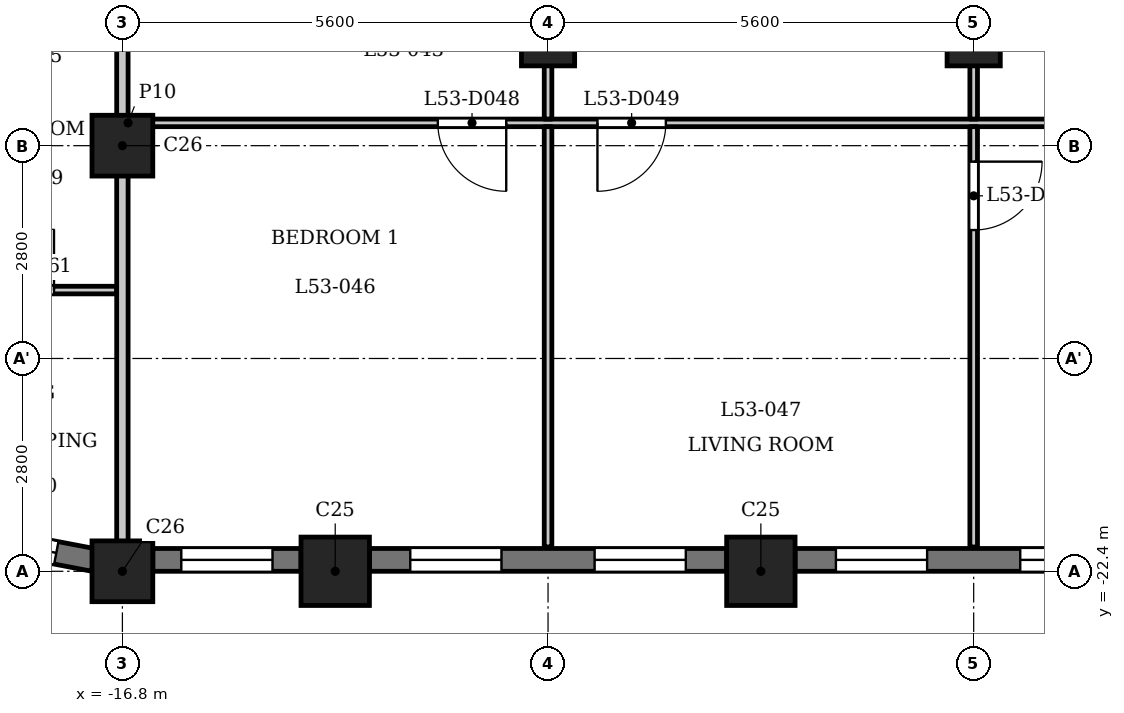
"""IFC4 building model, lengths in metres.
Left out: names, types, materials, properties, quantities, classifications, styles, units other than length and angle.
Written with IfcOpenShell. Run it as: python <this file> out.ifc"""

import sys

from ifc_helpers import new_model, si_unit, direction, frame, frame_2d, origin, origin_2d, place, context, subcontext, project, spatial, rectangle, extrude, element, fill, save


model = new_model("IFC4")
c1 = context("Model", 3, precision=1e-05, world=origin(), true_north=direction((0.0, 1.0)))
c2 = subcontext(c1, "Body", "Model", "MODEL_VIEW")
j1 = project(units=[si_unit("LENGTHUNIT", "METRE"), si_unit("PLANEANGLEUNIT", "RADIAN")], contexts=[c1])
p1 = place(None, origin())
s1 = spatial("IfcSite", under=j1, at=p1, CompositionType="ELEMENT")
p2 = place(p1, origin())
s2 = spatial("IfcBuilding", under=s1, at=p2, CompositionType="ELEMENT")
p3 = place(p2, frame((0.0, 0.0, 206.4)))
s3 = spatial("IfcBuildingStorey", under=s2, at=p3, CompositionType="ELEMENT", Elevation=206.4)
for number, where, z_axis, x_axis in (
    (1, (-14.0, -22.4, 0.0), (0.0, 0.0, 1.0), (1.0, 0.0, 0.0)),
    (2, (-8.4, -22.4, 0.0), (0.0, 0.0, 1.0), (1.0, 0.0, 0.0)),
):
    element("IfcColumn", number, at=place(p3, frame(where, z_axis=z_axis, x_axis=x_axis)), inside=s3, PredefinedType="COLUMN", context=c2, shape_type="SweptSolid", body=[
        extrude(rectangle(XDim=0.9, YDim=0.9, at=origin_2d()), origin(), (0.0, 0.0, 1.0), 3.5),
    ])
for number, where, z_axis, x_axis in (
    (3, (-16.8, -22.4, 0.0), (0.0, 0.0, 1.0), (1.0, 0.0, 0.0)),
    (4, (-16.8, -16.8, 0.0), (0.0, 0.0, 1.0), (1.0, 0.0, 0.0)),
):
    element("IfcColumn", number, at=place(p3, frame(where, z_axis=z_axis, x_axis=x_axis)), inside=s3, PredefinedType="COLUMN", context=c2, shape_type="SweptSolid", body=[
        extrude(rectangle(XDim=0.8, YDim=0.8, at=origin_2d()), origin(), (0.0, 0.0, 1.0), 3.5),
    ])
for number, where, z_axis, x_axis in (
    (5, (-11.2, -15.4, 0.0), (0.0, 0.0, 1.0), (1.0, 0.0, 0.0)),
    (6, (-5.6, -15.4, 0.0), (0.0, 0.0, 1.0), (1.0, 0.0, 0.0)),
):
    element("IfcColumn", number, at=place(p3, frame(where, z_axis=z_axis, x_axis=x_axis)), inside=s3, PredefinedType="COLUMN", context=c2, shape_type="SweptSolid", body=[
        extrude(rectangle(XDim=0.7, YDim=0.7, at=origin_2d()), origin(), (0.0, 0.0, 1.0), 3.5),
    ])
p4 = place(p3, frame((-18.946, -21.914, 0.0), z_axis=(0.0, 0.0, 1.0), x_axis=(0.98230529033, -0.187286722942, 0.0)))
e7 = element("IfcWall", 7, at=p4, inside=s3, PredefinedType="SOLIDWALL", context=c2, shape_type="SweptSolid", body=[
    extrude(rectangle(XDim=1.799, YDim=0.3, at=frame_2d((0.899, 0.0))), origin(), (0.0, 0.0, 1.0), 2.5),
])
p5 = place(p4, frame((0.5, 0.0, 0.6)))
e8 = element("IfcOpeningElement", 8, at=p5, cuts=e7, PredefinedType="OPENING", context=c2, shape_type="SweptSolid", body=[
    extrude(rectangle(XDim=0.8, YDim=1.55, at=frame_2d((0.4, 0.775))), frame((0.0, 0.16, 0.0), z_axis=(0.0, -1.0, 0.0), x_axis=(1.0, 0.0, 0.0)), (0.0, 0.0, 1.0), 0.32),
])
p6 = place(p3, frame((-16.4, -22.25, 0.0), z_axis=(0.0, 0.0, 1.0), x_axis=(1.0, 0.0, 0.0)))
e9 = element("IfcWall", 9, at=p6, inside=s3, PredefinedType="SOLIDWALL", context=c2, shape_type="SweptSolid", body=[
    extrude(rectangle(XDim=1.95, YDim=0.3, at=frame_2d((0.975, 0.0))), origin(), (0.0, 0.0, 1.0), 2.5),
])
p7 = place(p6, frame((0.375, 0.0, 0.6)))
e10 = element("IfcOpeningElement", 10, at=p7, cuts=e9, PredefinedType="OPENING", context=c2, shape_type="SweptSolid", body=[
    extrude(rectangle(XDim=1.2, YDim=1.55, at=frame_2d((0.6, 0.775))), frame((0.0, 0.16, 0.0), z_axis=(0.0, -1.0, 0.0), x_axis=(1.0, 0.0, 0.0)), (0.0, 0.0, 1.0), 0.32),
])
p8 = place(p3, frame((-13.55, -22.25, 0.0), z_axis=(0.0, 0.0, 1.0), x_axis=(1.0, 0.0, 0.0)))
e11 = element("IfcWall", 11, at=p8, inside=s3, PredefinedType="SOLIDWALL", context=c2, shape_type="SweptSolid", body=[
    extrude(rectangle(XDim=4.7, YDim=0.3, at=frame_2d((2.35, 0.0))), origin(), (0.0, 0.0, 1.0), 2.5),
])
p9 = place(p8, frame((0.538, 0.0, 0.6)))
e12 = element("IfcOpeningElement", 12, at=p9, cuts=e11, PredefinedType="OPENING", context=c2, shape_type="SweptSolid", body=[
    extrude(rectangle(XDim=1.2, YDim=1.55, at=frame_2d((0.6, 0.775))), frame((0.0, 0.16, 0.0), z_axis=(0.0, -1.0, 0.0), x_axis=(1.0, 0.0, 0.0)), (0.0, 0.0, 1.0), 0.32),
])
p10 = place(p8, frame((2.962, 0.0, 0.6)))
e13 = element("IfcOpeningElement", 13, at=p10, cuts=e11, PredefinedType="OPENING", context=c2, shape_type="SweptSolid", body=[
    extrude(rectangle(XDim=1.2, YDim=1.55, at=frame_2d((0.6, 0.775))), frame((0.0, 0.16, 0.0), z_axis=(0.0, -1.0, 0.0), x_axis=(1.0, 0.0, 0.0)), (0.0, 0.0, 1.0), 0.32),
])
p11 = place(p3, frame((-7.95, -22.25, 0.0), z_axis=(0.0, 0.0, 1.0), x_axis=(1.0, 0.0, 0.0)))
e14 = element("IfcWall", 14, at=p11, inside=s3, PredefinedType="SOLIDWALL", context=c2, shape_type="SweptSolid", body=[
    extrude(rectangle(XDim=4.7, YDim=0.3, at=frame_2d((2.35, 0.0))), origin(), (0.0, 0.0, 1.0), 2.5),
])
p12 = place(p11, frame((0.538, 0.0, 0.6)))
e15 = element("IfcOpeningElement", 15, at=p12, cuts=e14, PredefinedType="OPENING", context=c2, shape_type="SweptSolid", body=[
    extrude(rectangle(XDim=1.2, YDim=1.55, at=frame_2d((0.6, 0.775))), frame((0.0, 0.16, 0.0), z_axis=(0.0, -1.0, 0.0), x_axis=(1.0, 0.0, 0.0)), (0.0, 0.0, 1.0), 0.32),
])
p13 = place(p11, frame((2.962, 0.0, 0.6)))
e16 = element("IfcOpeningElement", 16, at=p13, cuts=e14, PredefinedType="OPENING", context=c2, shape_type="SweptSolid", body=[
    extrude(rectangle(XDim=1.2, YDim=1.55, at=frame_2d((0.6, 0.775))), frame((0.0, 0.16, 0.0), z_axis=(0.0, -1.0, 0.0), x_axis=(1.0, 0.0, 0.0)), (0.0, 0.0, 1.0), 0.32),
])
p14 = place(p3, frame((-22.856, -18.7, 0.0), z_axis=(0.0, 0.0, 1.0), x_axis=(1.0, 0.0, 0.0)))
e17 = element("IfcWall", 17, at=p14, inside=s3, PredefinedType="PARTITIONING", context=c2, shape_type="SweptSolid", body=[
    extrude(rectangle(XDim=5.981, YDim=0.1, at=frame_2d((2.99, 0.0))), origin(), (0.0, 0.0, 1.0), 3.2),
])
p15 = place(p14, frame((4.356, 0.0, 0.0)))
e18 = element("IfcOpeningElement", 18, at=p15, cuts=e17, PredefinedType="OPENING", context=c2, shape_type="SweptSolid", body=[
    extrude(rectangle(XDim=0.8, YDim=2.1, at=frame_2d((0.4, 1.05))), frame((0.0, 0.06, 0.0), z_axis=(0.0, -1.0, 0.0), x_axis=(1.0, 0.0, 0.0)), (0.0, 0.0, 1.0), 0.12),
])
p16 = place(p14, frame((2.084, 0.0, 0.0)))
e19 = element("IfcOpeningElement", 19, at=p16, cuts=e17, PredefinedType="OPENING", context=c2, shape_type="SweptSolid", body=[
    extrude(rectangle(XDim=0.9, YDim=2.1, at=frame_2d((0.45, 1.05))), frame((0.0, 0.06, 0.0), z_axis=(0.0, -1.0, 0.0), x_axis=(1.0, 0.0, 0.0)), (0.0, 0.0, 1.0), 0.12),
])
p17 = place(p3, frame((-16.725, -16.5, 0.0), z_axis=(0.0, 0.0, 1.0), x_axis=(1.0, 0.0, 0.0)))
e20 = element("IfcWall", 20, at=p17, inside=s3, PredefinedType="PARTITIONING", context=c2, shape_type="SweptSolid", body=[
    extrude(rectangle(XDim=33.45, YDim=0.1, at=frame_2d((16.725, 0.0))), origin(), (0.0, 0.0, 1.0), 3.2),
])
p18 = place(p17, frame((4.075, 0.0, 0.0)))
e21 = element("IfcOpeningElement", 21, at=p18, cuts=e20, PredefinedType="OPENING", context=c2, shape_type="SweptSolid", body=[
    extrude(rectangle(XDim=0.9, YDim=2.1, at=frame_2d((0.45, 1.05))), frame((0.0, 0.06, 0.0), z_axis=(0.0, -1.0, 0.0), x_axis=(1.0, 0.0, 0.0)), (0.0, 0.0, 1.0), 0.12),
])
p19 = place(p17, frame((6.175, 0.0, 0.0)))
e22 = element("IfcOpeningElement", 22, at=p19, cuts=e20, PredefinedType="OPENING", context=c2, shape_type="SweptSolid", body=[
    extrude(rectangle(XDim=0.9, YDim=2.1, at=frame_2d((0.45, 1.05))), frame((0.0, 0.06, 0.0), z_axis=(0.0, -1.0, 0.0), x_axis=(1.0, 0.0, 0.0)), (0.0, 0.0, 1.0), 0.12),
])
p20 = place(p17, frame((30.575, 0.0, 0.0)))
e23 = element("IfcOpeningElement", 23, at=p20, cuts=e20, PredefinedType="OPENING", context=c2, shape_type="SweptSolid", body=[
    extrude(rectangle(XDim=0.9, YDim=2.1, at=frame_2d((0.45, 1.05))), frame((0.0, 0.06, 0.0), z_axis=(0.0, -1.0, 0.0), x_axis=(1.0, 0.0, 0.0)), (0.0, 0.0, 1.0), 0.12),
])
p21 = place(p17, frame((22.975, 0.0, 0.0)))
e24 = element("IfcOpeningElement", 24, at=p21, cuts=e20, PredefinedType="OPENING", context=c2, shape_type="SweptSolid", body=[
    extrude(rectangle(XDim=0.9, YDim=2.1, at=frame_2d((0.45, 1.05))), frame((0.0, 0.06, 0.0), z_axis=(0.0, -1.0, 0.0), x_axis=(1.0, 0.0, 0.0)), (0.0, 0.0, 1.0), 0.12),
])
p22 = place(p3, frame((-16.8, -22.31, 0.0), z_axis=(0.0, 0.0, 1.0), x_axis=(0.0, 1.0, 0.0)))
e25 = element("IfcWall", 25, at=p22, inside=s3, PredefinedType="PARTITIONING", context=c2, shape_type="SweptSolid", body=[
    extrude(rectangle(XDim=6.835, YDim=0.15, at=frame_2d((3.417, 0.0))), origin(), (0.0, 0.0, 1.0), 2.55),
])
p23 = place(p3, frame((-11.2, -22.08, 0.0), z_axis=(0.0, 0.0, 1.0), x_axis=(0.0, 1.0, 0.0)))
e26 = element("IfcWall", 26, at=p23, inside=s3, PredefinedType="PARTITIONING", context=c2, shape_type="SweptSolid", body=[
    extrude(rectangle(XDim=5.53, YDim=0.1, at=frame_2d((2.765, 0.0))), origin(), (0.0, 0.0, 1.0), 3.2),
])
p24 = place(p3, frame((-11.2, -16.45, 0.0), z_axis=(0.0, 0.0, 1.0), x_axis=(0.0, 1.0, 0.0)))
e27 = element("IfcWall", 27, at=p24, inside=s3, PredefinedType="PARTITIONING", context=c2, shape_type="SweptSolid", body=[
    extrude(rectangle(XDim=3.175, YDim=0.1, at=frame_2d((1.587, 0.0))), origin(), (0.0, 0.0, 1.0), 3.2),
])
p25 = place(p24, frame((1.85, 0.0, 0.0)))
e28 = element("IfcOpeningElement", 28, at=p25, cuts=e27, PredefinedType="OPENING", context=c2, shape_type="SweptSolid", body=[
    extrude(rectangle(XDim=0.9, YDim=2.1, at=frame_2d((0.45, 1.05))), frame((0.0, 0.06, 0.0), z_axis=(0.0, -1.0, 0.0), x_axis=(1.0, 0.0, 0.0)), (0.0, 0.0, 1.0), 0.12),
])
p26 = place(p3, frame((-5.6, -22.08, 0.0), z_axis=(0.0, 0.0, 1.0), x_axis=(0.0, 1.0, 0.0)))
e29 = element("IfcWall", 29, at=p26, inside=s3, PredefinedType="PARTITIONING", context=c2, shape_type="SweptSolid", body=[
    extrude(rectangle(XDim=5.53, YDim=0.1, at=frame_2d((2.765, 0.0))), origin(), (0.0, 0.0, 1.0), 3.2),
])
p27 = place(p26, frame((4.17, 0.0, 0.0)))
e30 = element("IfcOpeningElement", 30, at=p27, cuts=e29, PredefinedType="OPENING", context=c2, shape_type="SweptSolid", body=[
    extrude(rectangle(XDim=0.9, YDim=2.1, at=frame_2d((0.45, 1.05))), frame((0.0, 0.06, 0.0), z_axis=(0.0, -1.0, 0.0), x_axis=(1.0, 0.0, 0.0)), (0.0, 0.0, 1.0), 0.12),
])
p28 = place(p3, frame((-5.6, -16.45, 0.0), z_axis=(0.0, 0.0, 1.0), x_axis=(0.0, 1.0, 0.0)))
e31 = element("IfcWall", 31, at=p28, inside=s3, PredefinedType="PARTITIONING", context=c2, shape_type="SweptSolid", body=[
    extrude(rectangle(XDim=3.175, YDim=0.1, at=frame_2d((1.587, 0.0))), origin(), (0.0, 0.0, 1.0), 3.2),
])
p29 = place(p28, frame((1.6, 0.0, 0.0)))
e32 = element("IfcOpeningElement", 32, at=p29, cuts=e31, PredefinedType="OPENING", context=c2, shape_type="SweptSolid", body=[
    extrude(rectangle(XDim=0.8, YDim=2.1, at=frame_2d((0.4, 1.05))), frame((0.0, 0.06, 0.0), z_axis=(0.0, -1.0, 0.0), x_axis=(1.0, 0.0, 0.0)), (0.0, 0.0, 1.0), 0.12),
])
p30 = place(p18, origin())
e33 = element("IfcDoor", 33, at=p30, inside=s3, OperationType="SINGLE_SWING_RIGHT", PredefinedType="DOOR", context=c2, shape_type="SweptSolid", body=[
    extrude(rectangle(XDim=0.9, YDim=2.1, at=frame_2d((0.45, 1.05))), frame((0.0, 0.025, 0.0), z_axis=(0.0, -1.0, 0.0), x_axis=(1.0, 0.0, 0.0)), (0.0, 0.0, 1.0), 0.05),
])
fill(e21, e33)
p31 = place(p19, origin())
e34 = element("IfcDoor", 34, at=p31, inside=s3, OperationType="SINGLE_SWING_LEFT", PredefinedType="DOOR", context=c2, shape_type="SweptSolid", body=[
    extrude(rectangle(XDim=0.9, YDim=2.1, at=frame_2d((0.45, 1.05))), frame((0.0, 0.025, 0.0), z_axis=(0.0, -1.0, 0.0), x_axis=(1.0, 0.0, 0.0)), (0.0, 0.0, 1.0), 0.05),
])
fill(e22, e34)
p32 = place(p27, origin())
e35 = element("IfcDoor", 35, at=p32, inside=s3, OperationType="SINGLE_SWING_RIGHT", PredefinedType="DOOR", context=c2, shape_type="SweptSolid", body=[
    extrude(rectangle(XDim=0.9, YDim=2.1, at=frame_2d((0.45, 1.05))), frame((0.0, 0.025, 0.0), z_axis=(0.0, -1.0, 0.0), x_axis=(1.0, 0.0, 0.0)), (0.0, 0.0, 1.0), 0.05),
])
fill(e30, e35)
p33 = place(p15, origin())
e36 = element("IfcDoor", 36, at=p33, inside=s3, OperationType="SINGLE_SWING_LEFT", PredefinedType="DOOR", context=c2, shape_type="SweptSolid", body=[
    extrude(rectangle(XDim=0.8, YDim=2.1, at=frame_2d((0.4, 1.05))), frame((0.0, 0.025, 0.0), z_axis=(0.0, -1.0, 0.0), x_axis=(1.0, 0.0, 0.0)), (0.0, 0.0, 1.0), 0.05),
])
fill(e18, e36)
p34 = place(p5, origin())
e37 = element("IfcWindow", 37, at=p34, inside=s3, PartitioningType="SINGLE_PANEL", PredefinedType="WINDOW", context=c2, shape_type="SweptSolid", body=[
    extrude(rectangle(XDim=0.8, YDim=1.55, at=frame_2d((0.4, 0.775))), frame((0.0, 0.03, 0.0), z_axis=(0.0, -1.0, 0.0), x_axis=(1.0, 0.0, 0.0)), (0.0, 0.0, 1.0), 0.06),
])
fill(e8, e37)
p35 = place(p7, origin())
e38 = element("IfcWindow", 38, at=p35, inside=s3, PartitioningType="SINGLE_PANEL", PredefinedType="WINDOW", context=c2, shape_type="SweptSolid", body=[
    extrude(rectangle(XDim=1.2, YDim=1.55, at=frame_2d((0.6, 0.775))), frame((0.0, 0.03, 0.0), z_axis=(0.0, -1.0, 0.0), x_axis=(1.0, 0.0, 0.0)), (0.0, 0.0, 1.0), 0.06),
])
fill(e10, e38)
p36 = place(p9, origin())
e39 = element("IfcWindow", 39, at=p36, inside=s3, PartitioningType="SINGLE_PANEL", PredefinedType="WINDOW", context=c2, shape_type="SweptSolid", body=[
    extrude(rectangle(XDim=1.2, YDim=1.55, at=frame_2d((0.6, 0.775))), frame((0.0, 0.03, 0.0), z_axis=(0.0, -1.0, 0.0), x_axis=(1.0, 0.0, 0.0)), (0.0, 0.0, 1.0), 0.06),
])
fill(e12, e39)
p37 = place(p10, origin())
e40 = element("IfcWindow", 40, at=p37, inside=s3, PartitioningType="SINGLE_PANEL", PredefinedType="WINDOW", context=c2, shape_type="SweptSolid", body=[
    extrude(rectangle(XDim=1.2, YDim=1.55, at=frame_2d((0.6, 0.775))), frame((0.0, 0.03, 0.0), z_axis=(0.0, -1.0, 0.0), x_axis=(1.0, 0.0, 0.0)), (0.0, 0.0, 1.0), 0.06),
])
fill(e13, e40)
p38 = place(p12, origin())
e41 = element("IfcWindow", 41, at=p38, inside=s3, PartitioningType="SINGLE_PANEL", PredefinedType="WINDOW", context=c2, shape_type="SweptSolid", body=[
    extrude(rectangle(XDim=1.2, YDim=1.55, at=frame_2d((0.6, 0.775))), frame((0.0, 0.03, 0.0), z_axis=(0.0, -1.0, 0.0), x_axis=(1.0, 0.0, 0.0)), (0.0, 0.0, 1.0), 0.06),
])
fill(e15, e41)
p39 = place(p13, origin())
e42 = element("IfcWindow", 42, at=p39, inside=s3, PartitioningType="SINGLE_PANEL", PredefinedType="WINDOW", context=c2, shape_type="SweptSolid", body=[
    extrude(rectangle(XDim=1.2, YDim=1.55, at=frame_2d((0.6, 0.775))), frame((0.0, 0.03, 0.0), z_axis=(0.0, -1.0, 0.0), x_axis=(1.0, 0.0, 0.0)), (0.0, 0.0, 1.0), 0.06),
])
fill(e16, e42)
save(model, sys.argv[1])
